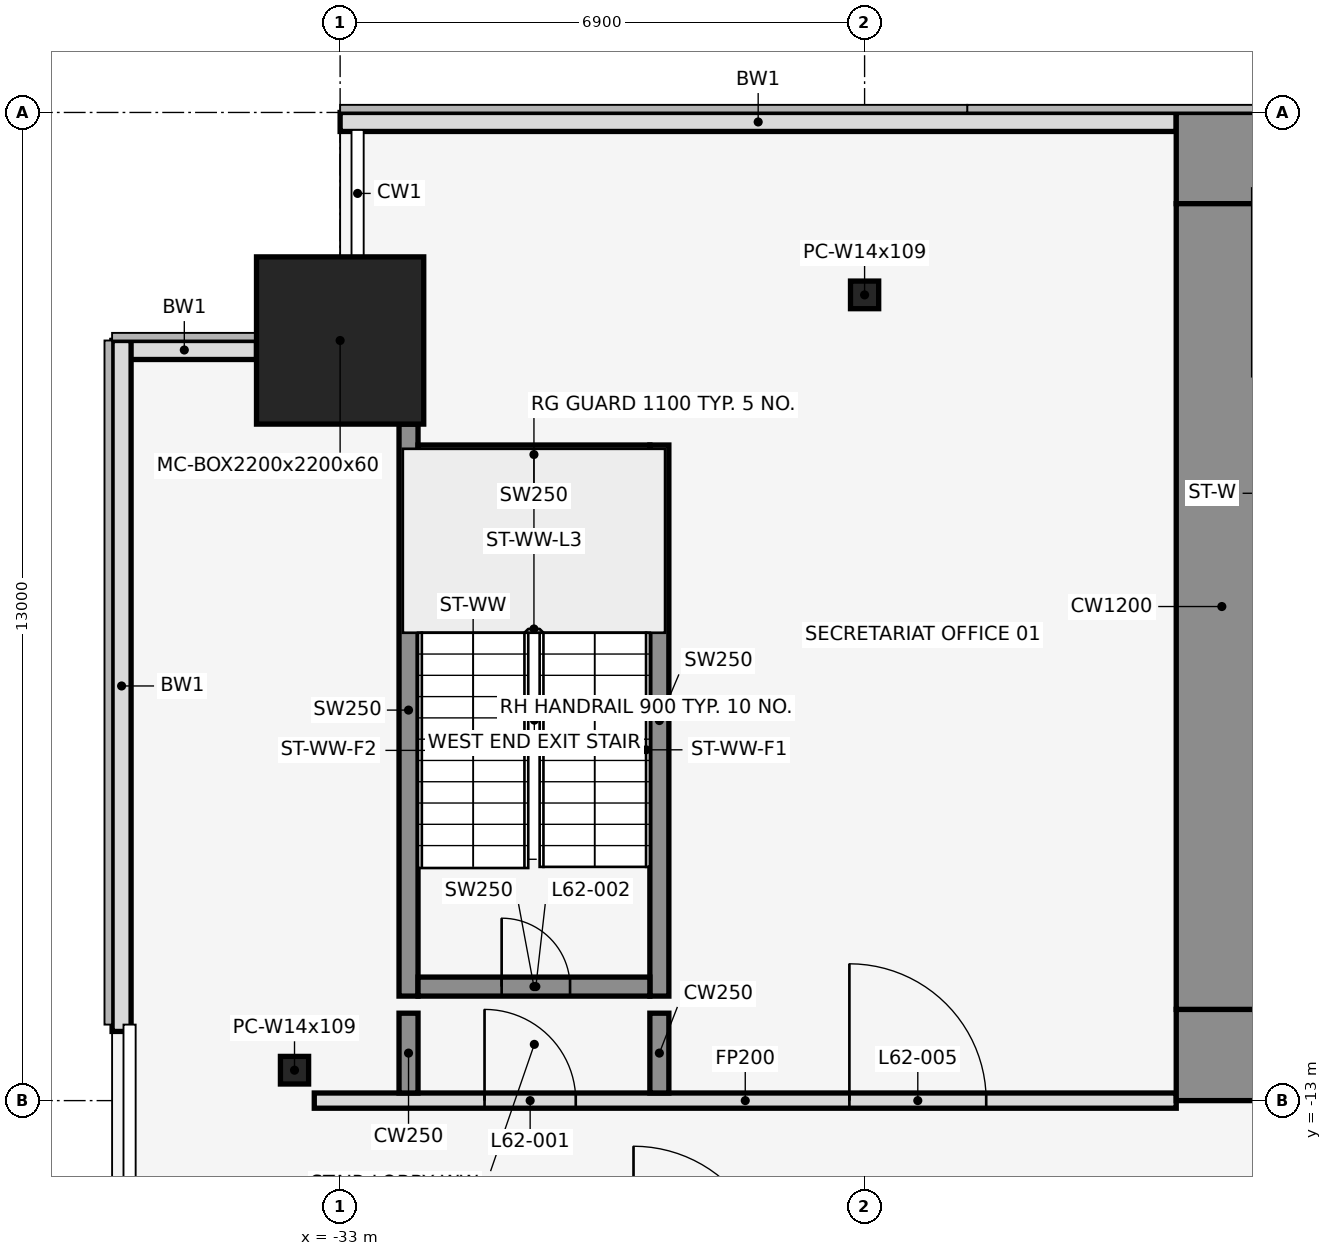
"""IFC4 building model, lengths in metres.
Left out: names, types, materials, properties, quantities, classifications, styles, units other than length and angle.
Written with IfcOpenShell. Run it as: python <this file> out.ifc"""

import sys

from ifc_helpers import new_model, si_unit, direction, frame, frame_2d, origin, origin_2d, place, context, subcontext, project, spatial, rectangle, hollow_rectangle, i_section, extrude, element, fill, save


model = new_model("IFC4")
c1 = context("Model", 3, precision=1e-05, world=origin(), true_north=direction((0.0, 1.0)))
c2 = subcontext(c1, "Body", "Model", "MODEL_VIEW")
j1 = project(units=[si_unit("LENGTHUNIT", "METRE"), si_unit("PLANEANGLEUNIT", "RADIAN")], contexts=[c1])
p1 = place(None, origin())
s1 = spatial("IfcSite", under=j1, at=p1, CompositionType="ELEMENT")
p2 = place(p1, origin())
s2 = spatial("IfcBuilding", under=s1, at=p2, CompositionType="ELEMENT")
p3 = place(p2, frame((0.0, 0.0, 275.0)))
s3 = spatial("IfcBuildingStorey", under=s2, at=p3, CompositionType="ELEMENT", Elevation=275.0)
p4 = place(p3, frame((-33.0, -3.0, 0.0), z_axis=(0.0, 0.0, 1.0), x_axis=(1.0, 0.0, 0.0)))
e1 = element("IfcColumn", 1, at=p4, inside=s3, PredefinedType="COLUMN", context=c2, shape_type="SweptSolid", body=[
    extrude(hollow_rectangle(XDim=2.2, YDim=2.2, WallThickness=0.06, at=origin_2d()), origin(), (0.0, 0.0, 1.0), 4.2),
])
for number, where, z_axis, x_axis in (
    (2, (-26.1, -2.4, 0.0), (0.0, 0.0, 1.0), (1.0, 0.0, 0.0)),
    (3, (-33.6, -12.6, 0.0), (0.0, 0.0, 1.0), (1.0, 0.0, 0.0)),
):
    element("IfcColumn", number, at=place(p3, frame(where, z_axis=z_axis, x_axis=x_axis)), inside=s3, PredefinedType="COLUMN", context=c2, shape_type="SweptSolid", body=[
        extrude(i_section(OverallWidth=0.371, OverallDepth=0.363, WebThickness=0.013, FlangeThickness=0.022, at=origin_2d()), origin(), (0.0, 0.0, 1.0), 4.2),
    ])
p5 = place(p3, frame((-22.0, -0.125, 0.0), z_axis=(0.0, 0.0, 1.0), x_axis=(-1.0, 0.0, 0.0)))
e4 = element("IfcWall", 4, at=p5, inside=s3, PredefinedType="STANDARD", context=c2, shape_type="SweptSolid", body=[
    extrude(rectangle(XDim=11.0, YDim=0.25, at=frame_2d((5.5, 0.0))), origin(), (0.0, 0.0, 1.0), 4.05),
])
p6 = place(p3, frame((-34.1, -3.125, 0.0), z_axis=(0.0, 0.0, 1.0), x_axis=(-1.0, 0.0, 0.0)))
e5 = element("IfcWall", 5, at=p6, inside=s3, PredefinedType="STANDARD", context=c2, shape_type="SweptSolid", body=[
    extrude(rectangle(XDim=1.9, YDim=0.25, at=frame_2d((0.95, 0.0))), origin(), (0.0, 0.0, 1.0), 4.05),
])
p7 = place(p3, frame((-35.875, -3.0, 0.0), z_axis=(0.0, 0.0, 1.0), x_axis=(0.0, -1.0, 0.0)))
e6 = element("IfcWall", 6, at=p7, inside=s3, PredefinedType="STANDARD", context=c2, shape_type="SweptSolid", body=[
    extrude(rectangle(XDim=9.09, YDim=0.25, at=frame_2d((4.545, 0.0))), origin(), (0.0, 0.0, 1.0), 4.05),
])
p8 = place(p3, frame((-32.1, -11.625, 0.0), z_axis=(0.0, 0.0, 1.0), x_axis=(0.0, 1.0, 0.0)))
e7 = element("IfcWall", 7, at=p8, inside=s3, PredefinedType="SHEAR", context=c2, shape_type="SweptSolid", body=[
    extrude(rectangle(XDim=7.525, YDim=0.25, at=frame_2d((3.762, 0.0))), origin(), (0.0, 0.0, 1.0), 4.2),
])
p9 = place(p3, frame((-28.8, -11.625, 0.0), z_axis=(0.0, 0.0, 1.0), x_axis=(0.0, 1.0, 0.0)))
e8 = element("IfcWall", 8, at=p9, inside=s3, PredefinedType="SHEAR", context=c2, shape_type="SweptSolid", body=[
    extrude(rectangle(XDim=7.25, YDim=0.25, at=frame_2d((3.625, 0.0))), origin(), (0.0, 0.0, 1.0), 4.2),
])
p10 = place(p3, frame((-31.975, -11.5, 0.0), z_axis=(0.0, 0.0, 1.0), x_axis=(1.0, 0.0, 0.0)))
e9 = element("IfcWall", 9, at=p10, inside=s3, PredefinedType="SHEAR", context=c2, shape_type="SweptSolid", body=[
    extrude(rectangle(XDim=3.05, YDim=0.25, at=frame_2d((1.525, 0.0))), origin(), (0.0, 0.0, 1.0), 4.2),
])
p11 = place(p10, frame((1.1, 0.0, 0.0)))
e10 = element("IfcOpeningElement", 10, at=p11, cuts=e9, PredefinedType="OPENING", context=c2, shape_type="SweptSolid", body=[
    extrude(rectangle(XDim=0.9, YDim=2.1, at=frame_2d((0.45, 1.05))), frame((0.0, 0.137, 0.0), z_axis=(0.0, -1.0, 0.0), x_axis=(1.0, 0.0, 0.0)), (0.0, 0.0, 1.0), 0.274),
])
p12 = place(p3, frame((-31.975, -4.5, 0.0), z_axis=(0.0, 0.0, 1.0), x_axis=(1.0, 0.0, 0.0)))
e11 = element("IfcWall", 11, at=p12, inside=s3, PredefinedType="SHEAR", context=c2, shape_type="SweptSolid", body=[
    extrude(rectangle(XDim=3.05, YDim=0.25, at=frame_2d((1.525, 0.0))), origin(), (0.0, 0.0, 1.0), 4.2),
])
p13 = place(p3, frame((-33.34, -13.0, 0.0), z_axis=(0.0, 0.0, 1.0), x_axis=(1.0, 0.0, 0.0)))
e12 = element("IfcWall", 12, at=p13, inside=s3, PredefinedType="PARTITIONING", context=c2, shape_type="SweptSolid", body=[
    extrude(rectangle(XDim=11.34, YDim=0.2, at=frame_2d((5.67, 0.0))), origin(), (0.0, 0.0, 1.0), 3.118),
])
p14 = place(p13, frame((2.24, 0.0, 0.0)))
e13 = element("IfcOpeningElement", 13, at=p14, cuts=e12, PredefinedType="OPENING", context=c2, shape_type="SweptSolid", body=[
    extrude(rectangle(XDim=1.2, YDim=2.1, at=frame_2d((0.6, 1.05))), frame((0.0, 0.112, 0.0), z_axis=(0.0, -1.0, 0.0), x_axis=(1.0, 0.0, 0.0)), (0.0, 0.0, 1.0), 0.224),
])
p15 = place(p13, frame((7.04, 0.0, 0.0)))
e14 = element("IfcOpeningElement", 14, at=p15, cuts=e12, PredefinedType="OPENING", context=c2, shape_type="SweptSolid", body=[
    extrude(rectangle(XDim=1.8, YDim=2.1, at=frame_2d((0.9, 1.05))), frame((0.0, 0.112, 0.0), z_axis=(0.0, -1.0, 0.0), x_axis=(1.0, 0.0, 0.0)), (0.0, 0.0, 1.0), 0.224),
])
for number, where, z_axis, x_axis in (
    (15, (-32.1, -12.9, 0.0), (0.0, 0.0, 1.0), (0.0, 1.0, 0.0)),
    (16, (-28.8, -12.9, 0.0), (0.0, 0.0, 1.0), (0.0, 1.0, 0.0)),
):
    element("IfcWall", number, at=place(p3, frame(where, z_axis=z_axis, x_axis=x_axis)), inside=s3, PredefinedType="SHEAR", context=c2, shape_type="SweptSolid", body=[
        extrude(rectangle(XDim=1.05, YDim=0.25, at=frame_2d((0.525, 0.0))), origin(), (0.0, 0.0, 1.0), 4.2),
    ])
p16 = place(p3, frame((-22.0, -0.6, 0.0), z_axis=(0.0, 0.0, 1.0), x_axis=(1.0, 0.0, 0.0)))
e17 = element("IfcWall", 17, at=p16, inside=s3, PredefinedType="SHEAR", context=c2, shape_type="SweptSolid", body=[
    extrude(rectangle(XDim=44.0, YDim=1.2, at=frame_2d((22.0, 0.0))), origin(), (0.0, 0.0, 1.0), 4.2),
])
p17 = place(p16, frame((18.55, 0.0, 0.0)))
e18 = element("IfcOpeningElement", 18, at=p17, cuts=e17, PredefinedType="OPENING", context=c2, shape_type="SweptSolid", body=[
    extrude(rectangle(XDim=0.9, YDim=2.1, at=frame_2d((0.45, 1.05))), frame((0.0, 0.612, 0.0), z_axis=(0.0, -1.0, 0.0), x_axis=(1.0, 0.0, 0.0)), (0.0, 0.0, 1.0), 1.224),
])
p18 = place(p16, frame((24.55, 0.0, 0.0)))
e19 = element("IfcOpeningElement", 19, at=p18, cuts=e17, PredefinedType="OPENING", context=c2, shape_type="SweptSolid", body=[
    extrude(rectangle(XDim=0.9, YDim=2.1, at=frame_2d((0.45, 1.05))), frame((0.0, 0.612, 0.0), z_axis=(0.0, -1.0, 0.0), x_axis=(1.0, 0.0, 0.0)), (0.0, 0.0, 1.0), 1.224),
])
p19 = place(p3, frame((-22.0, -12.4, 0.0), z_axis=(0.0, 0.0, 1.0), x_axis=(1.0, 0.0, 0.0)))
e20 = element("IfcWall", 20, at=p19, inside=s3, PredefinedType="SHEAR", context=c2, shape_type="SweptSolid", body=[
    extrude(rectangle(XDim=44.0, YDim=1.2, at=frame_2d((22.0, 0.0))), origin(), (0.0, 0.0, 1.0), 4.2),
])
p20 = place(p19, frame((2.2, 0.0, 0.0)))
e21 = element("IfcOpeningElement", 21, at=p20, cuts=e20, PredefinedType="OPENING", context=c2, shape_type="SweptSolid", body=[
    extrude(rectangle(XDim=1.2, YDim=2.1, at=frame_2d((0.6, 1.05))), frame((0.0, 0.612, 0.0), z_axis=(0.0, -1.0, 0.0), x_axis=(1.0, 0.0, 0.0)), (0.0, 0.0, 1.0), 1.224),
])
p21 = place(p19, frame((21.4, 0.0, 0.0)))
e22 = element("IfcOpeningElement", 22, at=p21, cuts=e20, PredefinedType="OPENING", context=c2, shape_type="SweptSolid", body=[
    extrude(rectangle(XDim=1.2, YDim=2.1, at=frame_2d((0.6, 1.05))), frame((0.0, 0.612, 0.0), z_axis=(0.0, -1.0, 0.0), x_axis=(1.0, 0.0, 0.0)), (0.0, 0.0, 1.0), 1.224),
])
p22 = place(p19, frame((40.6, 0.0, 0.0)))
e23 = element("IfcOpeningElement", 23, at=p22, cuts=e20, PredefinedType="OPENING", context=c2, shape_type="SweptSolid", body=[
    extrude(rectangle(XDim=1.2, YDim=2.1, at=frame_2d((0.6, 1.05))), frame((0.0, 0.612, 0.0), z_axis=(0.0, -1.0, 0.0), x_axis=(1.0, 0.0, 0.0)), (0.0, 0.0, 1.0), 1.224),
])
p23 = place(p19, frame((16.0, 0.0, 0.0)))
e24 = element("IfcOpeningElement", 24, at=p23, cuts=e20, PredefinedType="OPENING", context=c2, shape_type="SweptSolid", body=[
    extrude(rectangle(XDim=1.8, YDim=2.1, at=frame_2d((0.9, 1.05))), frame((0.0, 0.612, 0.0), z_axis=(0.0, -1.0, 0.0), x_axis=(1.0, 0.0, 0.0)), (0.0, 0.0, 1.0), 1.224),
])
p24 = place(p19, frame((6.3, 0.0, 0.0)))
e25 = element("IfcOpeningElement", 25, at=p24, cuts=e20, PredefinedType="OPENING", context=c2, shape_type="SweptSolid", body=[
    extrude(rectangle(XDim=1.2, YDim=2.1, at=frame_2d((0.6, 1.05))), frame((0.0, 0.612, 0.0), z_axis=(0.0, -1.0, 0.0), x_axis=(1.0, 0.0, 0.0)), (0.0, 0.0, 1.0), 1.224),
])
p25 = place(p19, frame((26.2, 0.0, 0.0)))
e26 = element("IfcOpeningElement", 26, at=p25, cuts=e20, PredefinedType="OPENING", context=c2, shape_type="SweptSolid", body=[
    extrude(rectangle(XDim=1.8, YDim=2.1, at=frame_2d((0.9, 1.05))), frame((0.0, 0.612, 0.0), z_axis=(0.0, -1.0, 0.0), x_axis=(1.0, 0.0, 0.0)), (0.0, 0.0, 1.0), 1.224),
])
p26 = place(p19, frame((36.5, 0.0, 0.0)))
e27 = element("IfcOpeningElement", 27, at=p26, cuts=e20, PredefinedType="OPENING", context=c2, shape_type="SweptSolid", body=[
    extrude(rectangle(XDim=1.2, YDim=2.1, at=frame_2d((0.6, 1.05))), frame((0.0, 0.612, 0.0), z_axis=(0.0, -1.0, 0.0), x_axis=(1.0, 0.0, 0.0)), (0.0, 0.0, 1.0), 1.224),
])
p27 = place(p3, frame((-21.4, -11.8, 0.0), z_axis=(0.0, 0.0, 1.0), x_axis=(0.0, 1.0, 0.0)))
e28 = element("IfcWall", 28, at=p27, inside=s3, PredefinedType="SHEAR", context=c2, shape_type="SweptSolid", body=[
    extrude(rectangle(XDim=10.6, YDim=1.2, at=frame_2d((5.3, 0.0))), origin(), (0.0, 0.0, 1.0), 4.2),
])
p28 = place(p14, origin())
e29 = element("IfcDoor", 29, at=p28, inside=s3, OperationType="SINGLE_SWING_LEFT", PredefinedType="DOOR", context=c2, shape_type="SweptSolid", body=[
    extrude(rectangle(XDim=1.2, YDim=2.1, at=frame_2d((0.6, 1.05))), frame((0.0, 0.025, 0.0), z_axis=(0.0, -1.0, 0.0), x_axis=(1.0, 0.0, 0.0)), (0.0, 0.0, 1.0), 0.05),
])
fill(e13, e29)
p29 = place(p11, origin())
e30 = element("IfcDoor", 30, at=p29, inside=s3, OperationType="SINGLE_SWING_LEFT", PredefinedType="DOOR", context=c2, shape_type="SweptSolid", body=[
    extrude(rectangle(XDim=0.9, YDim=2.1, at=frame_2d((0.45, 1.05))), frame((0.0, 0.025, 0.0), z_axis=(0.0, -1.0, 0.0), x_axis=(1.0, 0.0, 0.0)), (0.0, 0.0, 1.0), 0.05),
])
fill(e10, e30)
p30 = place(p15, origin())
e31 = element("IfcDoor", 31, at=p30, inside=s3, OperationType="SINGLE_SWING_LEFT", PredefinedType="DOOR", context=c2, shape_type="SweptSolid", body=[
    extrude(rectangle(XDim=1.8, YDim=2.1, at=frame_2d((0.9, 1.05))), frame((0.0, 0.025, 0.0), z_axis=(0.0, -1.0, 0.0), x_axis=(1.0, 0.0, 0.0)), (0.0, 0.0, 1.0), 0.05),
])
fill(e14, e31)
save(model, sys.argv[1])
